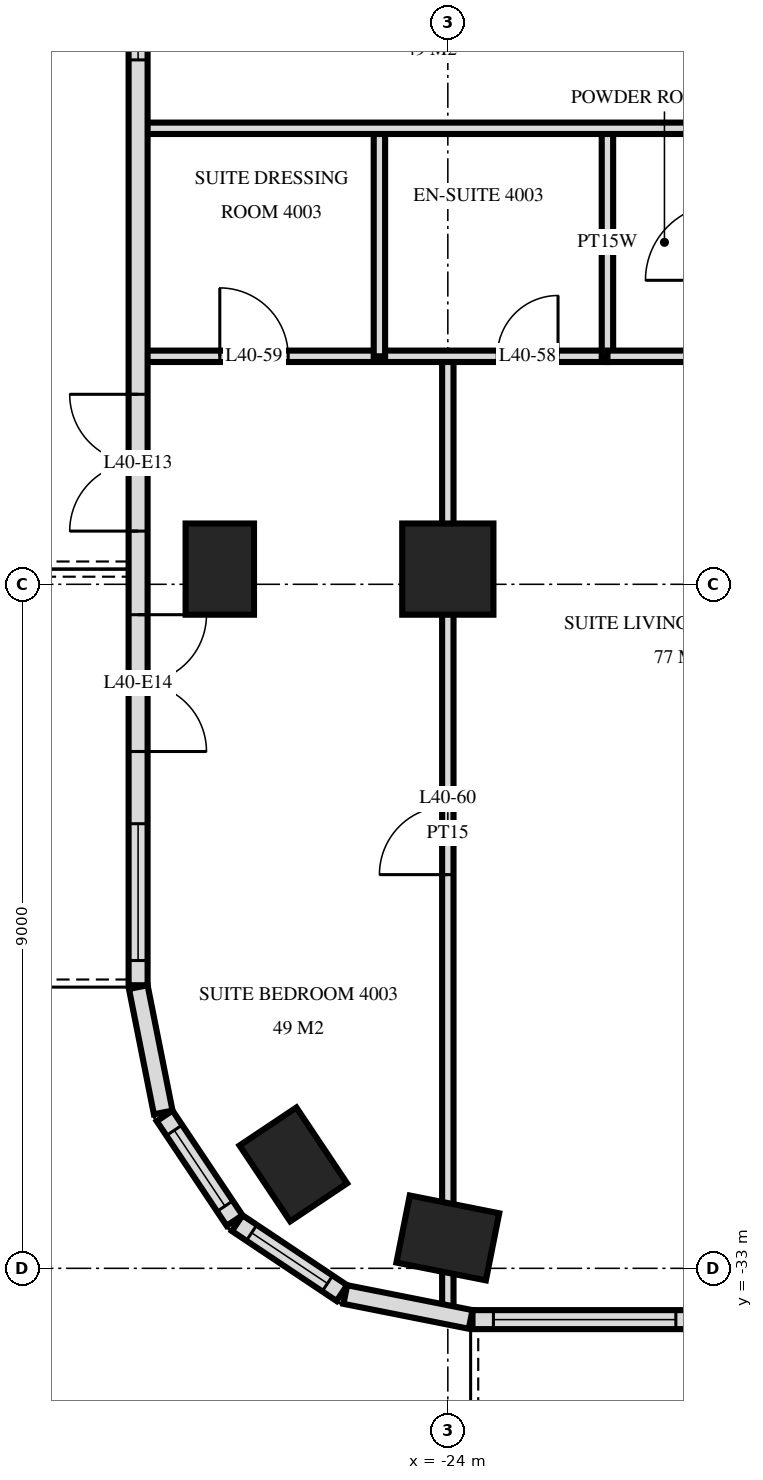
"""IFC4 building model, lengths in metres.
Left out: names, types, materials, properties, quantities, classifications, styles, units other than length and angle.
Written with IfcOpenShell. Run it as: python <this file> out.ifc"""

import sys

from ifc_helpers import new_model, si_unit, direction, frame, frame_2d, origin, origin_2d, place, context, subcontext, project, spatial, rectangle, extrude, element, fill, save


model = new_model("IFC4")
c1 = context("Model", 3, precision=1e-05, world=origin(), true_north=direction((0.0, 1.0)))
c2 = subcontext(c1, "Body", "Model", "MODEL_VIEW")
j1 = project(units=[si_unit("LENGTHUNIT", "METRE"), si_unit("PLANEANGLEUNIT", "RADIAN")], contexts=[c1])
p1 = place(None, origin())
s1 = spatial("IfcSite", under=j1, at=p1, CompositionType="ELEMENT")
p2 = place(p1, origin())
s2 = spatial("IfcBuilding", under=s1, at=p2, CompositionType="ELEMENT")
p3 = place(p2, frame((0.0, 0.0, 156.0)))
s3 = spatial("IfcBuildingStorey", under=s2, at=p3, CompositionType="ELEMENT", Elevation=156.0)
for number, where, z_axis, x_axis in (
    (1, (-27.0, -23.8, 0.0), (0.0, 0.0, 1.0), (0.0, 1.0, 0.0)),
    (2, (-26.033, -31.633, 0.0), (0.0, 0.0, 1.0), (-0.556, 0.831, 0.0)),
    (3, (-24.0, -32.6, 0.0), (0.0, 0.0, 1.0), (-0.981, 0.195, 0.0)),
):
    element("IfcColumn", number, at=place(p3, frame(where, z_axis=z_axis, x_axis=x_axis)), inside=s3, PredefinedType="COLUMN", context=c2, shape_type="SweptSolid", body=[
        extrude(rectangle(XDim=1.2, YDim=0.9, at=origin_2d()), origin(), (0.0, 0.0, 1.0), 3.6),
    ])
p4 = place(p3, frame((-24.0, -23.8, 0.0), z_axis=(0.0, 0.0, 1.0), x_axis=(1.0, 0.0, 0.0)))
e4 = element("IfcColumn", 4, at=p4, inside=s3, PredefinedType="COLUMN", context=c2, shape_type="SweptSolid", body=[
    extrude(rectangle(XDim=1.2, YDim=1.2, at=origin_2d()), origin(), (0.0, 0.0, 1.0), 3.6),
])
p5 = place(p3, frame((-28.075, -3.325, 0.0), z_axis=(0.0, 0.0, 1.0), x_axis=(0.0, -1.0, 0.0)))
e5 = element("IfcWall", 5, at=p5, inside=s3, PredefinedType="SOLIDWALL", context=c2, shape_type="SweptSolid", body=[
    extrude(rectangle(XDim=25.951, YDim=0.25, at=frame_2d((12.975, 0.0))), origin(), (0.0, 0.0, 1.0), 3.32),
])
p6 = place(p5, frame((6.65, 0.0, 0.0)))
e6 = element("IfcOpeningElement", 6, at=p6, cuts=e5, PredefinedType="OPENING", context=c2, shape_type="SweptSolid", body=[
    extrude(rectangle(XDim=1.8, YDim=2.4, at=frame_2d((0.9, 1.2))), frame((0.0, 0.135, 0.0), z_axis=(0.0, -1.0, 0.0), x_axis=(1.0, 0.0, 0.0)), (0.0, 0.0, 1.0), 0.27),
])
p7 = place(p5, frame((12.575, 0.0, 0.3)))
e7 = element("IfcOpeningElement", 7, at=p7, cuts=e5, PredefinedType="OPENING", context=c2, shape_type="SweptSolid", body=[
    extrude(rectangle(XDim=1.2, YDim=2.1, at=frame_2d((0.6, 1.05))), frame((0.0, 0.135, 0.0), z_axis=(0.0, -1.0, 0.0), x_axis=(1.0, 0.0, 0.0)), (0.0, 0.0, 1.0), 0.27),
])
p8 = place(p5, frame((18.175, 0.0, 0.0)))
e8 = element("IfcOpeningElement", 8, at=p8, cuts=e5, PredefinedType="OPENING", context=c2, shape_type="SweptSolid", body=[
    extrude(rectangle(XDim=1.8, YDim=2.4, at=frame_2d((0.9, 1.2))), frame((0.0, 0.135, 0.0), z_axis=(0.0, -1.0, 0.0), x_axis=(1.0, 0.0, 0.0)), (0.0, 0.0, 1.0), 0.27),
])
p9 = place(p5, frame((21.075, 0.0, 0.0)))
e9 = element("IfcOpeningElement", 9, at=p9, cuts=e5, PredefinedType="OPENING", context=c2, shape_type="SweptSolid", body=[
    extrude(rectangle(XDim=1.8, YDim=2.4, at=frame_2d((0.9, 1.2))), frame((0.0, 0.135, 0.0), z_axis=(0.0, -1.0, 0.0), x_axis=(1.0, 0.0, 0.0)), (0.0, 0.0, 1.0), 0.27),
])
p10 = place(p5, frame((23.825, 0.0, 0.3)))
e10 = element("IfcOpeningElement", 10, at=p10, cuts=e5, PredefinedType="OPENING", context=c2, shape_type="SweptSolid", body=[
    extrude(rectangle(XDim=1.8, YDim=2.1, at=frame_2d((0.9, 1.05))), frame((0.0, 0.135, 0.0), z_axis=(0.0, -1.0, 0.0), x_axis=(1.0, 0.0, 0.0)), (0.0, 0.0, 1.0), 0.27),
])
p11 = place(p3, frame((-28.073, -29.3, 0.0), z_axis=(0.0, 0.0, 1.0), x_axis=(0.194999110559, -0.980803419081, 0.0)))
e11 = element("IfcWall", 11, at=p11, inside=s3, PredefinedType="SOLIDWALL", context=c2, shape_type="SweptSolid", body=[
    extrude(rectangle(XDim=1.681, YDim=0.25, at=frame_2d((0.841, 0.0))), origin(), (0.0, 0.0, 1.0), 3.32),
])
p12 = place(p3, frame((-27.726, -30.994, 0.0), z_axis=(0.0, 0.0, 1.0), x_axis=(0.55555029066, -0.831482937015, 0.0)))
e12 = element("IfcWall", 12, at=p12, inside=s3, PredefinedType="SOLIDWALL", context=c2, shape_type="SweptSolid", body=[
    extrude(rectangle(XDim=1.656, YDim=0.25, at=frame_2d((0.828, 0.0))), origin(), (0.0, 0.0, 1.0), 3.32),
])
p13 = place(p12, frame((0.228, 0.0, 0.9)))
e13 = element("IfcOpeningElement", 13, at=p13, cuts=e12, PredefinedType="OPENING", context=c2, shape_type="SweptSolid", body=[
    extrude(rectangle(XDim=1.2, YDim=1.5, at=frame_2d((0.6, 0.75))), frame((0.0, 0.135, 0.0), z_axis=(0.0, -1.0, 0.0), x_axis=(1.0, 0.0, 0.0)), (0.0, 0.0, 1.0), 0.27),
])
p14 = place(p3, frame((-26.771, -32.406, 0.0), z_axis=(0.0, 0.0, 1.0), x_axis=(0.831482937015, -0.55555029066, 0.0)))
e14 = element("IfcWall", 14, at=p14, inside=s3, PredefinedType="SOLIDWALL", context=c2, shape_type="SweptSolid", body=[
    extrude(rectangle(XDim=1.656, YDim=0.25, at=frame_2d((0.828, 0.0))), origin(), (0.0, 0.0, 1.0), 3.32),
])
p15 = place(p14, frame((0.228, 0.0, 0.9)))
e15 = element("IfcOpeningElement", 15, at=p15, cuts=e14, PredefinedType="OPENING", context=c2, shape_type="SweptSolid", body=[
    extrude(rectangle(XDim=1.2, YDim=1.5, at=frame_2d((0.6, 0.75))), frame((0.0, 0.135, 0.0), z_axis=(0.0, -1.0, 0.0), x_axis=(1.0, 0.0, 0.0)), (0.0, 0.0, 1.0), 0.27),
])
p16 = place(p3, frame((-25.349, -33.344, 0.0), z_axis=(0.0, 0.0, 1.0), x_axis=(0.980775640221, -0.19513878023, 0.0)))
e16 = element("IfcWall", 16, at=p16, inside=s3, PredefinedType="SOLIDWALL", context=c2, shape_type="SweptSolid", body=[
    extrude(rectangle(XDim=1.681, YDim=0.25, at=frame_2d((0.841, 0.0))), origin(), (0.0, 0.0, 1.0), 3.32),
])
p17 = place(p3, frame((-23.675, -33.675, 0.0), z_axis=(0.0, 0.0, 1.0), x_axis=(1.0, 0.0, 0.0)))
e17 = element("IfcWall", 17, at=p17, inside=s3, PredefinedType="SOLIDWALL", context=c2, shape_type="SweptSolid", body=[
    extrude(rectangle(XDim=47.351, YDim=0.25, at=frame_2d((23.675, 0.0))), origin(), (0.0, 0.0, 1.0), 3.32),
])
p18 = place(p17, frame((0.275, 0.0, 0.3)))
e18 = element("IfcOpeningElement", 18, at=p18, cuts=e17, PredefinedType="OPENING", context=c2, shape_type="SweptSolid", body=[
    extrude(rectangle(XDim=2.4, YDim=2.1, at=frame_2d((1.2, 1.05))), frame((0.0, 0.135, 0.0), z_axis=(0.0, -1.0, 0.0), x_axis=(1.0, 0.0, 0.0)), (0.0, 0.0, 1.0), 0.27),
])
p19 = place(p17, frame((3.425, 0.0, 0.0)))
e19 = element("IfcOpeningElement", 19, at=p19, cuts=e17, PredefinedType="OPENING", context=c2, shape_type="SweptSolid", body=[
    extrude(rectangle(XDim=1.8, YDim=2.4, at=frame_2d((0.9, 1.2))), frame((0.0, 0.135, 0.0), z_axis=(0.0, -1.0, 0.0), x_axis=(1.0, 0.0, 0.0)), (0.0, 0.0, 1.0), 0.27),
])
p20 = place(p17, frame((7.775, 0.0, 0.0)))
e20 = element("IfcOpeningElement", 20, at=p20, cuts=e17, PredefinedType="OPENING", context=c2, shape_type="SweptSolid", body=[
    extrude(rectangle(XDim=1.8, YDim=2.4, at=frame_2d((0.9, 1.2))), frame((0.0, 0.135, 0.0), z_axis=(0.0, -1.0, 0.0), x_axis=(1.0, 0.0, 0.0)), (0.0, 0.0, 1.0), 0.27),
])
p21 = place(p17, frame((12.275, 0.0, 0.0)))
e21 = element("IfcOpeningElement", 21, at=p21, cuts=e17, PredefinedType="OPENING", context=c2, shape_type="SweptSolid", body=[
    extrude(rectangle(XDim=1.8, YDim=2.4, at=frame_2d((0.9, 1.2))), frame((0.0, 0.135, 0.0), z_axis=(0.0, -1.0, 0.0), x_axis=(1.0, 0.0, 0.0)), (0.0, 0.0, 1.0), 0.27),
])
p22 = place(p17, frame((14.975, 0.0, 0.3)))
e22 = element("IfcOpeningElement", 22, at=p22, cuts=e17, PredefinedType="OPENING", context=c2, shape_type="SweptSolid", body=[
    extrude(rectangle(XDim=2.4, YDim=2.1, at=frame_2d((1.2, 1.05))), frame((0.0, 0.135, 0.0), z_axis=(0.0, -1.0, 0.0), x_axis=(1.0, 0.0, 0.0)), (0.0, 0.0, 1.0), 0.27),
])
p23 = place(p17, frame((17.975, 0.0, 0.3)))
e23 = element("IfcOpeningElement", 23, at=p23, cuts=e17, PredefinedType="OPENING", context=c2, shape_type="SweptSolid", body=[
    extrude(rectangle(XDim=2.4, YDim=2.1, at=frame_2d((1.2, 1.05))), frame((0.0, 0.135, 0.0), z_axis=(0.0, -1.0, 0.0), x_axis=(1.0, 0.0, 0.0)), (0.0, 0.0, 1.0), 0.27),
])
p24 = place(p17, frame((21.275, 0.0, 0.0)))
e24 = element("IfcOpeningElement", 24, at=p24, cuts=e17, PredefinedType="OPENING", context=c2, shape_type="SweptSolid", body=[
    extrude(rectangle(XDim=1.8, YDim=2.4, at=frame_2d((0.9, 1.2))), frame((0.0, 0.135, 0.0), z_axis=(0.0, -1.0, 0.0), x_axis=(1.0, 0.0, 0.0)), (0.0, 0.0, 1.0), 0.27),
])
p25 = place(p17, frame((24.275, 0.0, 0.0)))
e25 = element("IfcOpeningElement", 25, at=p25, cuts=e17, PredefinedType="OPENING", context=c2, shape_type="SweptSolid", body=[
    extrude(rectangle(XDim=1.8, YDim=2.4, at=frame_2d((0.9, 1.2))), frame((0.0, 0.135, 0.0), z_axis=(0.0, -1.0, 0.0), x_axis=(1.0, 0.0, 0.0)), (0.0, 0.0, 1.0), 0.27),
])
p26 = place(p17, frame((26.975, 0.0, 0.3)))
e26 = element("IfcOpeningElement", 26, at=p26, cuts=e17, PredefinedType="OPENING", context=c2, shape_type="SweptSolid", body=[
    extrude(rectangle(XDim=2.4, YDim=2.1, at=frame_2d((1.2, 1.05))), frame((0.0, 0.135, 0.0), z_axis=(0.0, -1.0, 0.0), x_axis=(1.0, 0.0, 0.0)), (0.0, 0.0, 1.0), 0.27),
])
p27 = place(p17, frame((30.275, 0.0, 0.0)))
e27 = element("IfcOpeningElement", 27, at=p27, cuts=e17, PredefinedType="OPENING", context=c2, shape_type="SweptSolid", body=[
    extrude(rectangle(XDim=1.8, YDim=2.4, at=frame_2d((0.9, 1.2))), frame((0.0, 0.135, 0.0), z_axis=(0.0, -1.0, 0.0), x_axis=(1.0, 0.0, 0.0)), (0.0, 0.0, 1.0), 0.27),
])
p28 = place(p17, frame((32.975, 0.0, 0.3)))
e28 = element("IfcOpeningElement", 28, at=p28, cuts=e17, PredefinedType="OPENING", context=c2, shape_type="SweptSolid", body=[
    extrude(rectangle(XDim=2.4, YDim=2.1, at=frame_2d((1.2, 1.05))), frame((0.0, 0.135, 0.0), z_axis=(0.0, -1.0, 0.0), x_axis=(1.0, 0.0, 0.0)), (0.0, 0.0, 1.0), 0.27),
])
p29 = place(p17, frame((36.275, 0.0, 0.0)))
e29 = element("IfcOpeningElement", 29, at=p29, cuts=e17, PredefinedType="OPENING", context=c2, shape_type="SweptSolid", body=[
    extrude(rectangle(XDim=1.8, YDim=2.4, at=frame_2d((0.9, 1.2))), frame((0.0, 0.135, 0.0), z_axis=(0.0, -1.0, 0.0), x_axis=(1.0, 0.0, 0.0)), (0.0, 0.0, 1.0), 0.27),
])
p30 = place(p17, frame((38.975, 0.0, 0.3)))
e30 = element("IfcOpeningElement", 30, at=p30, cuts=e17, PredefinedType="OPENING", context=c2, shape_type="SweptSolid", body=[
    extrude(rectangle(XDim=2.4, YDim=2.1, at=frame_2d((1.2, 1.05))), frame((0.0, 0.135, 0.0), z_axis=(0.0, -1.0, 0.0), x_axis=(1.0, 0.0, 0.0)), (0.0, 0.0, 1.0), 0.27),
])
p31 = place(p17, frame((41.975, 0.0, 0.3)))
e31 = element("IfcOpeningElement", 31, at=p31, cuts=e17, PredefinedType="OPENING", context=c2, shape_type="SweptSolid", body=[
    extrude(rectangle(XDim=2.4, YDim=2.1, at=frame_2d((1.2, 1.05))), frame((0.0, 0.135, 0.0), z_axis=(0.0, -1.0, 0.0), x_axis=(1.0, 0.0, 0.0)), (0.0, 0.0, 1.0), 0.27),
])
p32 = place(p17, frame((45.125, 0.0, 0.0)))
e32 = element("IfcOpeningElement", 32, at=p32, cuts=e17, PredefinedType="OPENING", context=c2, shape_type="SweptSolid", body=[
    extrude(rectangle(XDim=1.8, YDim=2.4, at=frame_2d((0.9, 1.2))), frame((0.0, 0.135, 0.0), z_axis=(0.0, -1.0, 0.0), x_axis=(1.0, 0.0, 0.0)), (0.0, 0.0, 1.0), 0.27),
])
p33 = place(p3, frame((-21.9, -21.0, 0.0), z_axis=(0.0, 0.0, 1.0), x_axis=(0.0, 1.0, 0.0)))
e33 = element("IfcWall", 33, at=p33, inside=s3, PredefinedType="PLUMBINGWALL", context=c2, shape_type="SweptSolid", body=[
    extrude(rectangle(XDim=3.0, YDim=0.15, at=frame_2d((1.5, 0.0))), origin(), (0.0, 0.0, 1.0), 3.32),
])
p34 = place(p3, frame((-24.0, -33.557, 0.0), z_axis=(0.0, 0.0, 1.0), x_axis=(0.0, 1.0, 0.0)))
e34 = element("IfcWall", 34, at=p34, inside=s3, PredefinedType="PARTITIONING", context=c2, shape_type="SweptSolid", body=[
    extrude(rectangle(XDim=12.557, YDim=0.15, at=frame_2d((6.278, 0.0))), origin(), (0.0, 0.0, 1.0), 3.32),
])
p35 = place(p34, frame((5.737, 0.0, 0.0)))
e35 = element("IfcOpeningElement", 35, at=p35, cuts=e34, PredefinedType="OPENING", context=c2, shape_type="SweptSolid", body=[
    extrude(rectangle(XDim=0.9, YDim=2.1, at=frame_2d((0.45, 1.05))), frame((0.0, 0.085, 0.0), z_axis=(0.0, -1.0, 0.0), x_axis=(1.0, 0.0, 0.0)), (0.0, 0.0, 1.0), 0.17),
])
p36 = place(p3, frame((-24.9, -21.0, 0.0), z_axis=(0.0, 0.0, 1.0), x_axis=(0.0, 1.0, 0.0)))
e36 = element("IfcWall", 36, at=p36, inside=s3, PredefinedType="PARTITIONING", context=c2, shape_type="SweptSolid", body=[
    extrude(rectangle(XDim=3.0, YDim=0.15, at=frame_2d((1.5, 0.0))), origin(), (0.0, 0.0, 1.0), 3.32),
])
p37 = place(p3, frame((-28.02, -21.0, 0.0), z_axis=(0.0, 0.0, 1.0), x_axis=(1.0, 0.0, 0.0)))
e37 = element("IfcWall", 37, at=p37, inside=s3, PredefinedType="PARTITIONING", context=c2, shape_type="SweptSolid", body=[
    extrude(rectangle(XDim=6.12, YDim=0.15, at=frame_2d((3.06, 0.0))), origin(), (0.0, 0.0, 1.0), 3.32),
])
p38 = place(p37, frame((4.67, 0.0, 0.0)))
e38 = element("IfcOpeningElement", 38, at=p38, cuts=e37, PredefinedType="OPENING", context=c2, shape_type="SweptSolid", body=[
    extrude(rectangle(XDim=0.8, YDim=2.1, at=frame_2d((0.4, 1.05))), frame((0.0, 0.085, 0.0), z_axis=(0.0, -1.0, 0.0), x_axis=(1.0, 0.0, 0.0)), (0.0, 0.0, 1.0), 0.17),
])
p39 = place(p37, frame((1.02, 0.0, 0.0)))
e39 = element("IfcOpeningElement", 39, at=p39, cuts=e37, PredefinedType="OPENING", context=c2, shape_type="SweptSolid", body=[
    extrude(rectangle(XDim=0.9, YDim=2.1, at=frame_2d((0.45, 1.05))), frame((0.0, 0.085, 0.0), z_axis=(0.0, -1.0, 0.0), x_axis=(1.0, 0.0, 0.0)), (0.0, 0.0, 1.0), 0.17),
])
p40 = place(p3, frame((-21.9, -21.0, 0.0), z_axis=(0.0, 0.0, 1.0), x_axis=(1.0, 0.0, 0.0)))
e40 = element("IfcWall", 40, at=p40, inside=s3, PredefinedType="PLUMBINGWALL", context=c2, shape_type="SweptSolid", body=[
    extrude(rectangle(XDim=1.5, YDim=0.15, at=frame_2d((0.75, 0.0))), origin(), (0.0, 0.0, 1.0), 3.32),
])
p41 = place(p3, frame((-28.02, -18.0, 0.0), z_axis=(0.0, 0.0, 1.0), x_axis=(1.0, 0.0, 0.0)))
e41 = element("IfcWall", 41, at=p41, inside=s3, PredefinedType="PARTITIONING", context=c2, shape_type="SweptSolid", body=[
    extrude(rectangle(XDim=56.04, YDim=0.15, at=frame_2d((28.02, 0.0))), origin(), (0.0, 0.0, 1.0), 3.32),
])
p42 = place(p41, frame((12.52, 0.0, 0.0)))
e42 = element("IfcOpeningElement", 42, at=p42, cuts=e41, PredefinedType="OPENING", context=c2, shape_type="SweptSolid", body=[
    extrude(rectangle(XDim=1.0, YDim=2.1, at=frame_2d((0.5, 1.05))), frame((0.0, 0.085, 0.0), z_axis=(0.0, -1.0, 0.0), x_axis=(1.0, 0.0, 0.0)), (0.0, 0.0, 1.0), 0.17),
])
p43 = place(p41, frame((8.32, 0.0, 0.0)))
e43 = element("IfcOpeningElement", 43, at=p43, cuts=e41, PredefinedType="OPENING", context=c2, shape_type="SweptSolid", body=[
    extrude(rectangle(XDim=1.0, YDim=2.1, at=frame_2d((0.5, 1.05))), frame((0.0, 0.085, 0.0), z_axis=(0.0, -1.0, 0.0), x_axis=(1.0, 0.0, 0.0)), (0.0, 0.0, 1.0), 0.17),
])
p44 = place(p41, frame((40.17, 0.0, 0.0)))
e44 = element("IfcOpeningElement", 44, at=p44, cuts=e41, PredefinedType="OPENING", context=c2, shape_type="SweptSolid", body=[
    extrude(rectangle(XDim=1.0, YDim=2.1, at=frame_2d((0.5, 1.05))), frame((0.0, 0.085, 0.0), z_axis=(0.0, -1.0, 0.0), x_axis=(1.0, 0.0, 0.0)), (0.0, 0.0, 1.0), 0.17),
])
p45 = place(p41, frame((44.87, 0.0, 0.0)))
e45 = element("IfcOpeningElement", 45, at=p45, cuts=e41, PredefinedType="OPENING", context=c2, shape_type="SweptSolid", body=[
    extrude(rectangle(XDim=1.0, YDim=2.1, at=frame_2d((0.5, 1.05))), frame((0.0, 0.085, 0.0), z_axis=(0.0, -1.0, 0.0), x_axis=(1.0, 0.0, 0.0)), (0.0, 0.0, 1.0), 0.17),
])
p46 = place(p41, frame((46.72, 0.0, 0.0)))
e46 = element("IfcOpeningElement", 46, at=p46, cuts=e41, PredefinedType="OPENING", context=c2, shape_type="SweptSolid", body=[
    extrude(rectangle(XDim=1.0, YDim=2.1, at=frame_2d((0.5, 1.05))), frame((0.0, 0.085, 0.0), z_axis=(0.0, -1.0, 0.0), x_axis=(1.0, 0.0, 0.0)), (0.0, 0.0, 1.0), 0.17),
])
p47 = place(p41, frame((18.52, 0.0, 0.0)))
e47 = element("IfcOpeningElement", 47, at=p47, cuts=e41, PredefinedType="OPENING", context=c2, shape_type="SweptSolid", body=[
    extrude(rectangle(XDim=1.0, YDim=2.1, at=frame_2d((0.5, 1.05))), frame((0.0, 0.085, 0.0), z_axis=(0.0, -1.0, 0.0), x_axis=(1.0, 0.0, 0.0)), (0.0, 0.0, 1.0), 0.17),
])
p48 = place(p41, frame((24.52, 0.0, 0.0)))
e48 = element("IfcOpeningElement", 48, at=p48, cuts=e41, PredefinedType="OPENING", context=c2, shape_type="SweptSolid", body=[
    extrude(rectangle(XDim=1.0, YDim=2.1, at=frame_2d((0.5, 1.05))), frame((0.0, 0.085, 0.0), z_axis=(0.0, -1.0, 0.0), x_axis=(1.0, 0.0, 0.0)), (0.0, 0.0, 1.0), 0.17),
])
p49 = place(p41, frame((30.52, 0.0, 0.0)))
e49 = element("IfcOpeningElement", 49, at=p49, cuts=e41, PredefinedType="OPENING", context=c2, shape_type="SweptSolid", body=[
    extrude(rectangle(XDim=1.0, YDim=2.1, at=frame_2d((0.5, 1.05))), frame((0.0, 0.085, 0.0), z_axis=(0.0, -1.0, 0.0), x_axis=(1.0, 0.0, 0.0)), (0.0, 0.0, 1.0), 0.17),
])
p50 = place(p41, frame((36.52, 0.0, 0.0)))
e50 = element("IfcOpeningElement", 50, at=p50, cuts=e41, PredefinedType="OPENING", context=c2, shape_type="SweptSolid", body=[
    extrude(rectangle(XDim=1.0, YDim=2.1, at=frame_2d((0.5, 1.05))), frame((0.0, 0.085, 0.0), z_axis=(0.0, -1.0, 0.0), x_axis=(1.0, 0.0, 0.0)), (0.0, 0.0, 1.0), 0.17),
])
p51 = place(p13, origin())
e51 = element("IfcWindow", 51, at=p51, inside=s3, PartitioningType="SINGLE_PANEL", PredefinedType="WINDOW", context=c2, shape_type="SweptSolid", body=[
    extrude(rectangle(XDim=1.2, YDim=1.5, at=frame_2d((0.6, 0.75))), frame((0.0, 0.03, 0.0), z_axis=(0.0, -1.0, 0.0), x_axis=(1.0, 0.0, 0.0)), (0.0, 0.0, 1.0), 0.06),
])
fill(e13, e51)
p52 = place(p15, origin())
e52 = element("IfcWindow", 52, at=p52, inside=s3, PartitioningType="SINGLE_PANEL", PredefinedType="WINDOW", context=c2, shape_type="SweptSolid", body=[
    extrude(rectangle(XDim=1.2, YDim=1.5, at=frame_2d((0.6, 0.75))), frame((0.0, 0.03, 0.0), z_axis=(0.0, -1.0, 0.0), x_axis=(1.0, 0.0, 0.0)), (0.0, 0.0, 1.0), 0.06),
])
fill(e15, e52)
p53 = place(p18, origin())
e53 = element("IfcWindow", 53, at=p53, inside=s3, PartitioningType="SINGLE_PANEL", PredefinedType="WINDOW", context=c2, shape_type="SweptSolid", body=[
    extrude(rectangle(XDim=2.4, YDim=2.1, at=frame_2d((1.2, 1.05))), frame((0.0, 0.03, 0.0), z_axis=(0.0, -1.0, 0.0), x_axis=(1.0, 0.0, 0.0)), (0.0, 0.0, 1.0), 0.06),
])
fill(e18, e53)
p54 = place(p7, origin())
e54 = element("IfcWindow", 54, at=p54, inside=s3, PartitioningType="SINGLE_PANEL", PredefinedType="WINDOW", context=c2, shape_type="SweptSolid", body=[
    extrude(rectangle(XDim=1.2, YDim=2.1, at=frame_2d((0.6, 1.05))), frame((0.0, 0.03, 0.0), z_axis=(0.0, -1.0, 0.0), x_axis=(1.0, 0.0, 0.0)), (0.0, 0.0, 1.0), 0.06),
])
fill(e7, e54)
p55 = place(p8, frame((0.9, 0.0, 0.0), z_axis=(0.0, 0.0, 1.0), x_axis=(-1.0, 0.0, 0.0)))
e55 = element("IfcDoor", 55, at=p55, inside=s3, OperationType="DOUBLE_DOOR_SINGLE_SWING", PredefinedType="DOOR", context=c2, shape_type="SweptSolid", body=[
    extrude(rectangle(XDim=1.8, YDim=2.4, at=frame_2d((0.0, 1.2))), frame((0.0, -0.025, 0.0), z_axis=(0.0, 1.0, 0.0), x_axis=(-1.0, 0.0, 0.0)), (0.0, 0.0, 1.0), 0.05),
])
fill(e8, e55)
p56 = place(p9, origin())
e56 = element("IfcDoor", 56, at=p56, inside=s3, OperationType="DOUBLE_DOOR_SINGLE_SWING", PredefinedType="DOOR", context=c2, shape_type="SweptSolid", body=[
    extrude(rectangle(XDim=1.8, YDim=2.4, at=frame_2d((0.9, 1.2))), frame((0.0, 0.025, 0.0), z_axis=(0.0, -1.0, 0.0), x_axis=(1.0, 0.0, 0.0)), (0.0, 0.0, 1.0), 0.05),
])
fill(e9, e56)
p57 = place(p10, origin())
e57 = element("IfcWindow", 57, at=p57, inside=s3, PartitioningType="SINGLE_PANEL", PredefinedType="WINDOW", context=c2, shape_type="SweptSolid", body=[
    extrude(rectangle(XDim=1.8, YDim=2.1, at=frame_2d((0.9, 1.05))), frame((0.0, 0.03, 0.0), z_axis=(0.0, -1.0, 0.0), x_axis=(1.0, 0.0, 0.0)), (0.0, 0.0, 1.0), 0.06),
])
fill(e10, e57)
p58 = place(p38, origin())
e58 = element("IfcDoor", 58, at=p58, inside=s3, OperationType="SINGLE_SWING_LEFT", PredefinedType="DOOR", context=c2, shape_type="SweptSolid", body=[
    extrude(rectangle(XDim=0.8, YDim=2.1, at=frame_2d((0.4, 1.05))), frame((0.0, 0.025, 0.0), z_axis=(0.0, -1.0, 0.0), x_axis=(1.0, 0.0, 0.0)), (0.0, 0.0, 1.0), 0.05),
])
fill(e38, e58)
p59 = place(p39, origin())
e59 = element("IfcDoor", 59, at=p59, inside=s3, OperationType="SINGLE_SWING_RIGHT", PredefinedType="DOOR", context=c2, shape_type="SweptSolid", body=[
    extrude(rectangle(XDim=0.9, YDim=2.1, at=frame_2d((0.45, 1.05))), frame((0.0, 0.025, 0.0), z_axis=(0.0, -1.0, 0.0), x_axis=(1.0, 0.0, 0.0)), (0.0, 0.0, 1.0), 0.05),
])
fill(e39, e59)
p60 = place(p35, origin())
e60 = element("IfcDoor", 60, at=p60, inside=s3, OperationType="SINGLE_SWING_RIGHT", PredefinedType="DOOR", context=c2, shape_type="SweptSolid", body=[
    extrude(rectangle(XDim=0.9, YDim=2.1, at=frame_2d((0.45, 1.05))), frame((0.0, 0.025, 0.0), z_axis=(0.0, -1.0, 0.0), x_axis=(1.0, 0.0, 0.0)), (0.0, 0.0, 1.0), 0.05),
])
fill(e35, e60)
save(model, sys.argv[1])
